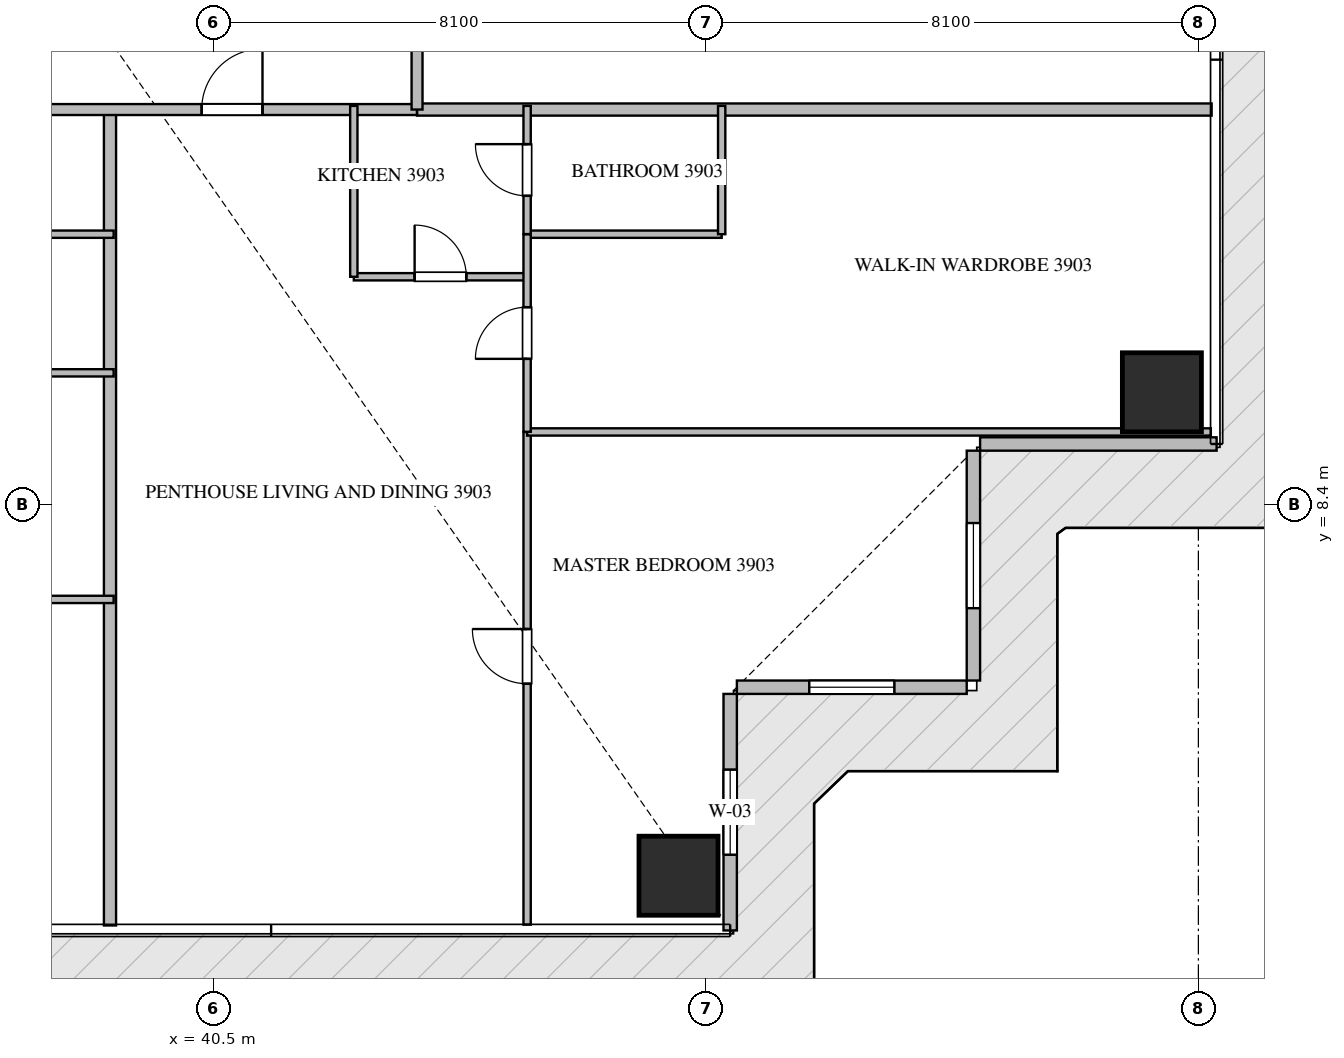
"""IFC4 building model, lengths in metres.
Left out: names, types, materials, properties, quantities, classifications, styles, units other than length and angle.
Written with IfcOpenShell. Run it as: python <this file> out.ifc"""

import sys

from ifc_helpers import new_model, si_unit, direction, frame, frame_2d, origin, origin_2d, place, context, subcontext, project, spatial, rectangle, extrude, source, transform, mapped, element, fill, save


model = new_model("IFC4")
c1 = context("Model", 3, precision=1e-05, world=origin(), true_north=direction((0.0, 1.0)))
c2 = subcontext(c1, "Body", "Model", "MODEL_VIEW")
j1 = project(units=[si_unit("LENGTHUNIT", "METRE"), si_unit("PLANEANGLEUNIT", "RADIAN")], contexts=[c1])
p1 = place(None, origin())
s1 = spatial("IfcSite", under=j1, at=p1, CompositionType="ELEMENT")
p2 = place(p1, origin())
s2 = spatial("IfcBuilding", under=s1, at=p2, CompositionType="ELEMENT")
p3 = place(p2, frame((0.0, 0.0, 157.65)))
s3 = spatial("IfcBuildingStorey", under=s2, at=p3, CompositionType="ELEMENT", Elevation=157.65)
m1 = source(origin(), c2, "Body", "SweptSolid", [
    extrude(rectangle(XDim=1.3, YDim=1.3, at=origin_2d()), origin(), (0.0, 0.0, 1.0), 3.75),
])
for number, where, z_axis, x_axis in (
    (1, (48.15, 2.3, -0.26), (0.0, 0.0, 1.0), (1.0, 0.0, 0.0)),
    (2, (56.1, 10.25, -0.26), (0.0, 0.0, 1.0), (1.0, 0.0, 0.0)),
):
    element("IfcColumn", number, at=place(p3, frame(where, z_axis=z_axis, x_axis=x_axis)), inside=s3, PredefinedType="COLUMN", context=c2, shape_type="MappedRepresentation", body=[
        mapped(m1, transform((0.0, 0.0, 0.0), scale=1.0)),
    ])
p4 = place(p3, frame((49.0, 1.4, 0.0), z_axis=(0.0, 0.0, 1.0), x_axis=(0.0, 1.0, 0.0)))
e3 = element("IfcWall", 3, at=p4, inside=s3, PredefinedType="ELEMENTEDWALL", context=c2, shape_type="SweptSolid", body=[
    extrude(rectangle(XDim=3.89, YDim=0.22, at=frame_2d((1.945, 0.0))), origin(), (0.0, 0.0, 1.0), 3.475),
])
p5 = place(p4, frame((1.245, 0.0, 0.65)))
e4 = element("IfcOpeningElement", 4, at=p5, cuts=e3, PredefinedType="OPENING", context=c2, shape_type="SweptSolid", body=[
    extrude(rectangle(XDim=1.4, YDim=2.05, at=frame_2d((0.7, 1.025))), frame((0.0, 0.12, 0.0), z_axis=(0.0, -1.0, 0.0), x_axis=(1.0, 0.0, 0.0)), (0.0, 0.0, 1.0), 0.24),
])
p6 = place(p3, frame((49.11, 5.4, 0.0), z_axis=(0.0, 0.0, 1.0), x_axis=(1.0, 0.0, 0.0)))
e5 = element("IfcWall", 5, at=p6, inside=s3, PredefinedType="ELEMENTEDWALL", context=c2, shape_type="SweptSolid", body=[
    extrude(rectangle(XDim=3.78, YDim=0.22, at=frame_2d((1.89, 0.0))), origin(), (0.0, 0.0, 1.0), 3.475),
])
p7 = place(p6, frame((1.19, 0.0, 0.65)))
e6 = element("IfcOpeningElement", 6, at=p7, cuts=e5, PredefinedType="OPENING", context=c2, shape_type="SweptSolid", body=[
    extrude(rectangle(XDim=1.4, YDim=2.05, at=frame_2d((0.7, 1.025))), frame((0.0, 0.12, 0.0), z_axis=(0.0, -1.0, 0.0), x_axis=(1.0, 0.0, 0.0)), (0.0, 0.0, 1.0), 0.24),
])
p8 = place(p3, frame((53.0, 5.51, 0.0), z_axis=(0.0, 0.0, 1.0), x_axis=(0.0, 1.0, 0.0)))
e7 = element("IfcWall", 7, at=p8, inside=s3, PredefinedType="ELEMENTEDWALL", context=c2, shape_type="SweptSolid", body=[
    extrude(rectangle(XDim=3.78, YDim=0.22, at=frame_2d((1.89, 0.0))), origin(), (0.0, 0.0, 1.0), 3.475),
])
p9 = place(p8, frame((1.19, 0.0, 0.65)))
e8 = element("IfcOpeningElement", 8, at=p9, cuts=e7, PredefinedType="OPENING", context=c2, shape_type="SweptSolid", body=[
    extrude(rectangle(XDim=1.4, YDim=2.05, at=frame_2d((0.7, 1.025))), frame((0.0, 0.12, 0.0), z_axis=(0.0, -1.0, 0.0), x_axis=(1.0, 0.0, 0.0)), (0.0, 0.0, 1.0), 0.24),
])
p10 = place(p3, frame((53.11, 9.4, 0.0), z_axis=(0.0, 0.0, 1.0), x_axis=(1.0, 0.0, 0.0)))
e9 = element("IfcWall", 9, at=p10, inside=s3, PredefinedType="ELEMENTEDWALL", context=c2, shape_type="SweptSolid", body=[
    extrude(rectangle(XDim=3.89, YDim=0.22, at=frame_2d((1.945, 0.0))), origin(), (0.0, 0.0, 1.0), 3.475),
])
p11 = place(p3, frame((38.8, 1.482, 0.0), z_axis=(0.0, 0.0, 1.0), x_axis=(0.0, 1.0, 0.0)))
e10 = element("IfcWall", 10, at=p11, inside=s3, PredefinedType="PARTITIONING", context=c2, shape_type="SweptSolid", body=[
    extrude(rectangle(XDim=13.418, YDim=0.2, at=frame_2d((6.709, 0.0))), origin(), (0.0, 0.0, 1.0), 3.49),
])
p12 = place(p3, frame((43.85, 14.9, 0.0), z_axis=(0.0, 0.0, 1.0), x_axis=(1.0, 0.0, 0.0)))
e11 = element("IfcWall", 11, at=p12, inside=s3, PredefinedType="PARTITIONING", context=c2, shape_type="SweptSolid", body=[
    extrude(rectangle(XDim=13.068, YDim=0.2, at=frame_2d((6.534, 0.0))), origin(), (0.0, 0.0, 1.0), 3.49),
])
p13 = place(p3, frame((20.952, 14.9, 0.0), z_axis=(0.0, 0.0, 1.0), x_axis=(1.0, 0.0, 0.0)))
e12 = element("IfcWall", 12, at=p13, inside=s3, PredefinedType="PARTITIONING", context=c2, shape_type="SweptSolid", body=[
    extrude(rectangle(XDim=22.896, YDim=0.18, at=frame_2d((11.448, 0.0))), origin(), (0.0, 0.0, 1.0), 3.49),
])
p14 = place(p13, frame((2.54, 0.0, 0.0)))
e13 = element("IfcOpeningElement", 13, at=p14, cuts=e12, PredefinedType="OPENING", context=c2, shape_type="SweptSolid", body=[
    extrude(rectangle(XDim=1.0, YDim=2.15, at=frame_2d((0.5, 1.075))), frame((0.0, 0.1, 0.0), z_axis=(0.0, -1.0, 0.0), x_axis=(1.0, 0.0, 0.0)), (0.0, 0.0, 1.0), 0.2),
])
p15 = place(p13, frame((6.985, 0.0, 0.0)))
e14 = element("IfcOpeningElement", 14, at=p15, cuts=e12, PredefinedType="OPENING", context=c2, shape_type="SweptSolid", body=[
    extrude(rectangle(XDim=1.0, YDim=2.15, at=frame_2d((0.5, 1.075))), frame((0.0, 0.1, 0.0), z_axis=(0.0, -1.0, 0.0), x_axis=(1.0, 0.0, 0.0)), (0.0, 0.0, 1.0), 0.2),
])
p16 = place(p13, frame((19.356, 0.0, 0.0)))
e15 = element("IfcOpeningElement", 15, at=p16, cuts=e12, PredefinedType="OPENING", context=c2, shape_type="SweptSolid", body=[
    extrude(rectangle(XDim=1.0, YDim=2.15, at=frame_2d((0.5, 1.075))), frame((0.0, 0.1, 0.0), z_axis=(0.0, -1.0, 0.0), x_axis=(1.0, 0.0, 0.0)), (0.0, 0.0, 1.0), 0.2),
])
p17 = place(p3, frame((43.85, 14.9, 0.0), z_axis=(0.0, 0.0, 1.0), x_axis=(0.0, 1.0, 0.0)))
e16 = element("IfcWall", 16, at=p17, inside=s3, PredefinedType="PARTITIONING", context=c2, shape_type="SweptSolid", body=[
    extrude(rectangle(XDim=18.7, YDim=0.18, at=frame_2d((9.35, 0.0))), origin(), (0.0, 0.0, 1.0), 3.49),
])
p18 = place(p17, frame((1.805, 0.0, 0.0)))
e17 = element("IfcOpeningElement", 17, at=p18, cuts=e16, PredefinedType="OPENING", context=c2, shape_type="SweptSolid", body=[
    extrude(rectangle(XDim=1.0, YDim=2.15, at=frame_2d((0.5, 1.075))), frame((0.0, 0.1, 0.0), z_axis=(0.0, -1.0, 0.0), x_axis=(1.0, 0.0, 0.0)), (0.0, 0.0, 1.0), 0.2),
])
p19 = place(p17, frame((14.833, 0.0, 0.0)))
e18 = element("IfcOpeningElement", 18, at=p19, cuts=e16, PredefinedType="OPENING", context=c2, shape_type="SweptSolid", body=[
    extrude(rectangle(XDim=1.0, YDim=2.15, at=frame_2d((0.5, 1.075))), frame((0.0, 0.1, 0.0), z_axis=(0.0, -1.0, 0.0), x_axis=(1.0, 0.0, 0.0)), (0.0, 0.0, 1.0), 0.2),
])
for number, where, z_axis, x_axis in (
    (19, (30.86, 6.844, 0.0), (0.0, 0.0, 1.0), (1.0, 0.0, 0.0)),
    (20, (30.86, 10.57, 0.0), (0.0, 0.0, 1.0), (1.0, 0.0, 0.0)),
    (21, (30.86, 12.85, 0.0), (0.0, 0.0, 1.0), (1.0, 0.0, 0.0)),
):
    element("IfcWall", number, at=place(p3, frame(where, z_axis=z_axis, x_axis=x_axis)), inside=s3, PredefinedType="PARTITIONING", context=c2, shape_type="SweptSolid", body=[
        extrude(rectangle(XDim=8.0, YDim=0.12, at=frame_2d((4.0, 0.0))), origin(), (0.0, 0.0, 1.0), 3.49),
    ])
p20 = place(p3, frame((42.81, 12.15, 0.0), z_axis=(0.0, 0.0, 1.0), x_axis=(1.0, 0.0, 0.0)))
e22 = element("IfcWall", 22, at=p20, inside=s3, PredefinedType="PARTITIONING", context=c2, shape_type="SweptSolid", body=[
    extrude(rectangle(XDim=2.85, YDim=0.12, at=frame_2d((1.425, 0.0))), origin(), (0.0, 0.0, 1.0), 3.49),
])
p21 = place(p20, frame((1.0, 0.0, 0.0)))
e23 = element("IfcOpeningElement", 23, at=p21, cuts=e22, PredefinedType="OPENING", context=c2, shape_type="SweptSolid", body=[
    extrude(rectangle(XDim=0.85, YDim=2.1, at=frame_2d((0.425, 1.05))), frame((0.0, 0.07, 0.0), z_axis=(0.0, -1.0, 0.0), x_axis=(1.0, 0.0, 0.0)), (0.0, 0.0, 1.0), 0.14),
])
p22 = place(p3, frame((42.81, 12.15, 0.0), z_axis=(0.0, 0.0, 1.0), x_axis=(0.0, 1.0, 0.0)))
e24 = element("IfcWall", 24, at=p22, inside=s3, PredefinedType="PARTITIONING", context=c2, shape_type="SweptSolid", body=[
    extrude(rectangle(XDim=2.81, YDim=0.12, at=frame_2d((1.405, 0.0))), origin(), (0.0, 0.0, 1.0), 3.49),
])
p23 = place(p3, frame((45.66, 1.495, 0.0), z_axis=(0.0, 0.0, 1.0), x_axis=(0.0, 1.0, 0.0)))
e25 = element("IfcWall", 25, at=p23, inside=s3, PredefinedType="PARTITIONING", context=c2, shape_type="SweptSolid", body=[
    extrude(rectangle(XDim=8.103, YDim=0.12, at=frame_2d((4.051, 0.0))), origin(), (0.0, 0.0, 1.0), 3.49),
])
p24 = place(p23, frame((3.962, 0.0, 0.0)))
e26 = element("IfcOpeningElement", 26, at=p24, cuts=e25, PredefinedType="OPENING", context=c2, shape_type="SweptSolid", body=[
    extrude(rectangle(XDim=0.9, YDim=2.1, at=frame_2d((0.45, 1.05))), frame((0.0, 0.07, 0.0), z_axis=(0.0, -1.0, 0.0), x_axis=(1.0, 0.0, 0.0)), (0.0, 0.0, 1.0), 0.14),
])
p25 = place(p3, frame((45.66, 9.598, 0.0), z_axis=(0.0, 0.0, 1.0), x_axis=(1.0, 0.0, 0.0)))
e27 = element("IfcWall", 27, at=p25, inside=s3, PredefinedType="PARTITIONING", context=c2, shape_type="SweptSolid", body=[
    extrude(rectangle(XDim=11.245, YDim=0.12, at=frame_2d((5.623, 0.0))), origin(), (0.0, 0.0, 1.0), 3.49),
])
p26 = place(p3, frame((45.66, 12.85, 0.0), z_axis=(0.0, 0.0, 1.0), x_axis=(1.0, 0.0, 0.0)))
e28 = element("IfcWall", 28, at=p26, inside=s3, PredefinedType="PARTITIONING", context=c2, shape_type="SweptSolid", body=[
    extrude(rectangle(XDim=3.2, YDim=0.12, at=frame_2d((1.6, 0.0))), origin(), (0.0, 0.0, 1.0), 3.49),
])
p27 = place(p3, frame((48.86, 12.85, 0.0), z_axis=(0.0, 0.0, 1.0), x_axis=(0.0, 1.0, 0.0)))
e29 = element("IfcWall", 29, at=p27, inside=s3, PredefinedType="PARTITIONING", context=c2, shape_type="SweptSolid", body=[
    extrude(rectangle(XDim=2.11, YDim=0.12, at=frame_2d((1.055, 0.0))), origin(), (0.0, 0.0, 1.0), 3.49),
])
p28 = place(p3, frame((45.66, 9.6, 0.0), z_axis=(0.0, 0.0, 1.0), x_axis=(0.0, 1.0, 0.0)))
e30 = element("IfcWall", 30, at=p28, inside=s3, PredefinedType="PARTITIONING", context=c2, shape_type="SweptSolid", body=[
    extrude(rectangle(XDim=3.25, YDim=0.12, at=frame_2d((1.625, 0.0))), origin(), (0.0, 0.0, 1.0), 3.49),
])
p29 = place(p28, frame((1.2, 0.0, 0.0)))
e31 = element("IfcOpeningElement", 31, at=p29, cuts=e30, PredefinedType="OPENING", context=c2, shape_type="SweptSolid", body=[
    extrude(rectangle(XDim=0.85, YDim=2.1, at=frame_2d((0.425, 1.05))), frame((0.0, 0.07, 0.0), z_axis=(0.0, -1.0, 0.0), x_axis=(1.0, 0.0, 0.0)), (0.0, 0.0, 1.0), 0.14),
])
p30 = place(p3, frame((45.66, 12.852, 0.0), z_axis=(0.0, 0.0, 1.0), x_axis=(0.0, 1.0, 0.0)))
e32 = element("IfcWall", 32, at=p30, inside=s3, PredefinedType="PARTITIONING", context=c2, shape_type="SweptSolid", body=[
    extrude(rectangle(XDim=2.108, YDim=0.12, at=frame_2d((1.054, 0.0))), origin(), (0.0, 0.0, 1.0), 3.49),
])
p31 = place(p30, frame((0.629, 0.0, 0.0)))
e33 = element("IfcOpeningElement", 33, at=p31, cuts=e32, PredefinedType="OPENING", context=c2, shape_type="SweptSolid", body=[
    extrude(rectangle(XDim=0.85, YDim=2.1, at=frame_2d((0.425, 1.05))), frame((0.0, 0.07, 0.0), z_axis=(0.0, -1.0, 0.0), x_axis=(1.0, 0.0, 0.0)), (0.0, 0.0, 1.0), 0.14),
])
m2 = source(origin(), c2, "Body", "SweptSolid", [
    extrude(rectangle(XDim=1.4, YDim=2.05, at=frame_2d((0.7, 1.025))), frame((0.0, 0.03, 0.0), z_axis=(0.0, -1.0, 0.0), x_axis=(1.0, 0.0, 0.0)), (0.0, 0.0, 1.0), 0.06),
])
p32 = place(p5, origin())
e34 = element("IfcWindow", 34, at=p32, inside=s3, PartitioningType="SINGLE_PANEL", PredefinedType="WINDOW", context=c2, shape_type="MappedRepresentation", body=[
    mapped(m2, transform((0.0, 0.0, 0.0), scale=1.0)),
])
fill(e4, e34)
p33 = place(p7, origin())
e35 = element("IfcWindow", 35, at=p33, inside=s3, PartitioningType="SINGLE_PANEL", PredefinedType="WINDOW", context=c2, shape_type="MappedRepresentation", body=[
    mapped(m2, transform((0.0, 0.0, 0.0), scale=1.0)),
])
fill(e6, e35)
p34 = place(p9, origin())
e36 = element("IfcWindow", 36, at=p34, inside=s3, PartitioningType="SINGLE_PANEL", PredefinedType="WINDOW", context=c2, shape_type="MappedRepresentation", body=[
    mapped(m2, transform((0.0, 0.0, 0.0), scale=1.0)),
])
fill(e8, e36)
m3 = source(origin(), c2, "Body", "SweptSolid", [
    extrude(rectangle(XDim=1.0, YDim=2.15, at=frame_2d((0.5, 1.075))), frame((0.0, 0.025, 0.0), z_axis=(0.0, -1.0, 0.0), x_axis=(1.0, 0.0, 0.0)), (0.0, 0.0, 1.0), 0.05),
])
p35 = place(p16, origin())
e37 = element("IfcDoor", 37, at=p35, inside=s3, OperationType="SINGLE_SWING_RIGHT", PredefinedType="DOOR", context=c2, shape_type="MappedRepresentation", body=[
    mapped(m3, transform((0.0, 0.0, 0.0), scale=1.0)),
])
fill(e15, e37)
m4 = source(origin(), c2, "Body", "SweptSolid", [
    extrude(rectangle(XDim=0.85, YDim=2.1, at=frame_2d((0.425, 1.05))), frame((0.0, 0.025, 0.0), z_axis=(0.0, -1.0, 0.0), x_axis=(1.0, 0.0, 0.0)), (0.0, 0.0, 1.0), 0.05),
])
p36 = place(p21, origin())
e38 = element("IfcDoor", 38, at=p36, inside=s3, OperationType="SINGLE_SWING_LEFT", PredefinedType="DOOR", context=c2, shape_type="MappedRepresentation", body=[
    mapped(m4, transform((0.0, 0.0, 0.0), scale=1.0)),
])
fill(e23, e38)
m5 = source(origin(), c2, "Body", "SweptSolid", [
    extrude(rectangle(XDim=0.9, YDim=2.1, at=frame_2d((0.45, 1.05))), frame((0.0, 0.025, 0.0), z_axis=(0.0, -1.0, 0.0), x_axis=(1.0, 0.0, 0.0)), (0.0, 0.0, 1.0), 0.05),
])
p37 = place(p24, origin())
e39 = element("IfcDoor", 39, at=p37, inside=s3, OperationType="SINGLE_SWING_RIGHT", PredefinedType="DOOR", context=c2, shape_type="MappedRepresentation", body=[
    mapped(m5, transform((0.0, 0.0, 0.0), scale=1.0)),
])
fill(e26, e39)
p38 = place(p29, origin())
e40 = element("IfcDoor", 40, at=p38, inside=s3, OperationType="SINGLE_SWING_LEFT", PredefinedType="DOOR", context=c2, shape_type="MappedRepresentation", body=[
    mapped(m4, transform((0.0, 0.0, 0.0), scale=1.0)),
])
fill(e31, e40)
p39 = place(p31, origin())
e41 = element("IfcDoor", 41, at=p39, inside=s3, OperationType="SINGLE_SWING_RIGHT", PredefinedType="DOOR", context=c2, shape_type="MappedRepresentation", body=[
    mapped(m4, transform((0.0, 0.0, 0.0), scale=1.0)),
])
fill(e33, e41)
save(model, sys.argv[1])
